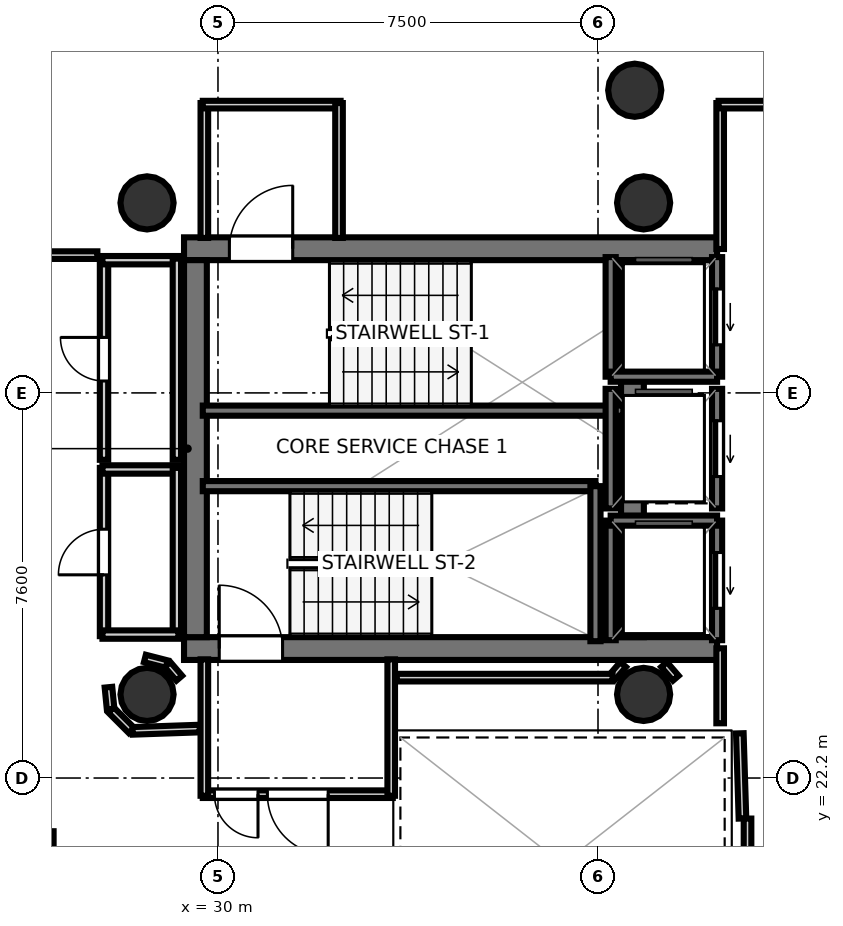
"""IFC4 building model, lengths in metres.
Left out: names, types, materials, properties, quantities, classifications, styles, units other than length and angle.
Written with IfcOpenShell. Run it as: python <this file> out.ifc"""

import sys

from ifc_helpers import new_model, si_unit, direction, frame, frame_2d, origin, origin_2d, place, context, subcontext, project, spatial, rectangle, hollow_circle, extrude, element, fill, save


model = new_model("IFC4")
c1 = context("Model", 3, precision=1e-05, world=origin(), true_north=direction((0.0, 1.0)))
c2 = subcontext(c1, "Body", "Model", "MODEL_VIEW")
j1 = project(units=[si_unit("LENGTHUNIT", "METRE"), si_unit("PLANEANGLEUNIT", "RADIAN")], contexts=[c1])
p1 = place(None, origin())
s1 = spatial("IfcSite", under=j1, at=p1, CompositionType="ELEMENT")
p2 = place(p1, origin())
s2 = spatial("IfcBuilding", under=s1, at=p2, CompositionType="ELEMENT")
p3 = place(p2, frame((0.0, 0.0, 246.4)))
s3 = spatial("IfcBuildingStorey", under=s2, at=p3, CompositionType="ELEMENT", Elevation=246.4)
p4 = place(p3, frame((29.33, 32.645, 0.0), z_axis=(0.0, 0.0, 1.0), x_axis=(1.0, 0.0, 0.0)))
e1 = element("IfcWall", 1, at=p4, inside=s3, PredefinedType="SHEAR", context=c2, shape_type="SweptSolid", body=[
    extrude(rectangle(XDim=10.52, YDim=0.45, at=frame_2d((5.26, 0.0))), origin(), (0.0, 0.0, 1.0), 3.52),
])
p5 = place(p4, frame((0.895, 0.0, 0.0)))
e2 = element("IfcOpeningElement", 2, at=p5, cuts=e1, PredefinedType="OPENING", context=c2, shape_type="SweptSolid", body=[
    extrude(rectangle(XDim=1.25, YDim=2.15, at=frame_2d((0.625, 1.075))), frame((0.0, 0.235, 0.0), z_axis=(0.0, -1.0, 0.0), x_axis=(1.0, 0.0, 0.0)), (0.0, 0.0, 1.0), 0.47),
])
p6 = place(p3, frame((29.33, 24.755, 0.0), z_axis=(0.0, 0.0, 1.0), x_axis=(1.0, 0.0, 0.0)))
e3 = element("IfcWall", 3, at=p6, inside=s3, PredefinedType="SHEAR", context=c2, shape_type="SweptSolid", body=[
    extrude(rectangle(XDim=10.52, YDim=0.45, at=frame_2d((5.26, 0.0))), origin(), (0.0, 0.0, 1.0), 3.52),
])
p7 = place(p6, frame((0.695, 0.0, 0.0)))
e4 = element("IfcOpeningElement", 4, at=p7, cuts=e3, PredefinedType="OPENING", context=c2, shape_type="SweptSolid", body=[
    extrude(rectangle(XDim=1.25, YDim=2.15, at=frame_2d((0.625, 1.075))), frame((0.0, 0.235, 0.0), z_axis=(0.0, -1.0, 0.0), x_axis=(1.0, 0.0, 0.0)), (0.0, 0.0, 1.0), 0.47),
])
for number, where, z_axis, x_axis in (
    (5, (29.555, 24.98, 0.0), (0.0, 0.0, 1.0), (0.0, 1.0, 0.0)),
    (6, (38.18, 24.98, 0.0), (0.0, 0.0, 1.0), (0.0, 1.0, 0.0)),
):
    element("IfcWall", number, at=place(p3, frame(where, z_axis=z_axis, x_axis=x_axis)), inside=s3, PredefinedType="SHEAR", context=c2, shape_type="SweptSolid", body=[
        extrude(rectangle(XDim=7.44, YDim=0.45, at=frame_2d((3.72, 0.0))), origin(), (0.0, 0.0, 1.0), 3.52),
    ])
for number, where, z_axis, x_axis in (
    (7, (28.6, 33.55, 0.0), (0.0, 0.0, 1.0), (1.0, 0.0, 0.0)),
    (8, (28.6, 23.85, 0.0), (0.0, 0.0, 1.0), (1.0, 0.0, 0.0)),
    (9, (38.4, 33.55, 0.0), (0.0, 0.0, 1.0), (1.0, 0.0, 0.0)),
    (10, (38.4, 23.85, 0.0), (0.0, 0.0, 1.0), (1.0, 0.0, 0.0)),
    (11, (38.225, 35.773, 0.0), (0.0, 0.0, 1.0), (1.0, 0.0, 0.0)),
):
    element("IfcColumn", number, at=place(p3, frame(where, z_axis=z_axis, x_axis=x_axis)), inside=s3, PredefinedType="COLUMN", context=c2, shape_type="SweptSolid", body=[
        extrude(hollow_circle(Radius=0.525, WallThickness=0.028, at=origin_2d()), origin(), (0.0, 0.0, 1.0), 3.7),
    ])
p8 = place(p3, frame((29.7, 29.45, 0.0), z_axis=(0.0, 0.0, 1.0), x_axis=(1.0, 0.0, 0.0)))
e12 = element("IfcWall", 12, at=p8, inside=s3, PredefinedType="SOLIDWALL", context=c2, shape_type="SweptSolid", body=[
    extrude(rectangle(XDim=8.3, YDim=0.2, at=frame_2d((4.15, 0.0))), origin(), (0.0, 0.0, 1.0), 3.52),
])
p9 = place(p3, frame((29.7, 27.96, 0.0), z_axis=(0.0, 0.0, 1.0), x_axis=(1.0, 0.0, 0.0)))
e13 = element("IfcWall", 13, at=p9, inside=s3, PredefinedType="SOLIDWALL", context=c2, shape_type="SweptSolid", body=[
    extrude(rectangle(XDim=7.75, YDim=0.2, at=frame_2d((3.875, 0.0))), origin(), (0.0, 0.0, 1.0), 3.52),
])
p10 = place(p3, frame((37.45, 24.9, 0.0), z_axis=(0.0, 0.0, 1.0), x_axis=(0.0, 1.0, 0.0)))
e14 = element("IfcWall", 14, at=p10, inside=s3, PredefinedType="SOLIDWALL", context=c2, shape_type="SweptSolid", body=[
    extrude(rectangle(XDim=3.06, YDim=0.2, at=frame_2d((1.53, 0.0))), origin(), (0.0, 0.0, 1.0), 3.52),
])
p11 = place(p3, frame((39.85, 30.12, 0.0), z_axis=(0.0, 0.0, 1.0), x_axis=(0.0, 1.0, 0.0)))
e15 = element("IfcWall", 15, at=p11, inside=s3, PredefinedType="SOLIDWALL", context=c2, shape_type="SweptSolid", body=[
    extrude(rectangle(XDim=2.36, YDim=0.2, at=frame_2d((1.18, 0.0))), origin(), (0.0, 0.0, 1.0), 3.52),
])
p12 = place(p11, frame((0.63, 0.0, 0.0)))
e16 = element("IfcOpeningElement", 16, at=p12, cuts=e15, PredefinedType="OPENING", context=c2, shape_type="SweptSolid", body=[
    extrude(rectangle(XDim=1.1, YDim=2.15, at=frame_2d((0.55, 1.075))), frame((0.0, 0.11, 0.0), z_axis=(0.0, -1.0, 0.0), x_axis=(1.0, 0.0, 0.0)), (0.0, 0.0, 1.0), 0.22),
])
p13 = place(p3, frame((37.75, 30.12, 0.0), z_axis=(0.0, 0.0, 1.0), x_axis=(0.0, 1.0, 0.0)))
e17 = element("IfcWall", 17, at=p13, inside=s3, PredefinedType="SOLIDWALL", context=c2, shape_type="SweptSolid", body=[
    extrude(rectangle(XDim=2.36, YDim=0.2, at=frame_2d((1.18, 0.0))), origin(), (0.0, 0.0, 1.0), 3.52),
])
p14 = place(p3, frame((37.75, 30.12, 0.0), z_axis=(0.0, 0.0, 1.0), x_axis=(1.0, 0.0, 0.0)))
e18 = element("IfcWall", 18, at=p14, inside=s3, PredefinedType="SOLIDWALL", context=c2, shape_type="SweptSolid", body=[
    extrude(rectangle(XDim=2.1, YDim=0.2, at=frame_2d((1.05, 0.0))), origin(), (0.0, 0.0, 1.0), 3.52),
])
p15 = place(p3, frame((39.85, 24.92, 0.0), z_axis=(0.0, 0.0, 1.0), x_axis=(0.0, 1.0, 0.0)))
e19 = element("IfcWall", 19, at=p15, inside=s3, PredefinedType="SOLIDWALL", context=c2, shape_type="SweptSolid", body=[
    extrude(rectangle(XDim=2.36, YDim=0.2, at=frame_2d((1.18, 0.0))), origin(), (0.0, 0.0, 1.0), 3.52),
])
p16 = place(p15, frame((0.63, 0.0, 0.0)))
e20 = element("IfcOpeningElement", 20, at=p16, cuts=e19, PredefinedType="OPENING", context=c2, shape_type="SweptSolid", body=[
    extrude(rectangle(XDim=1.1, YDim=2.15, at=frame_2d((0.55, 1.075))), frame((0.0, 0.11, 0.0), z_axis=(0.0, -1.0, 0.0), x_axis=(1.0, 0.0, 0.0)), (0.0, 0.0, 1.0), 0.22),
])
p17 = place(p3, frame((37.75, 24.92, 0.0), z_axis=(0.0, 0.0, 1.0), x_axis=(0.0, 1.0, 0.0)))
e21 = element("IfcWall", 21, at=p17, inside=s3, PredefinedType="SOLIDWALL", context=c2, shape_type="SweptSolid", body=[
    extrude(rectangle(XDim=2.36, YDim=0.2, at=frame_2d((1.18, 0.0))), origin(), (0.0, 0.0, 1.0), 3.52),
])
p18 = place(p3, frame((37.75, 27.28, 0.0), z_axis=(0.0, 0.0, 1.0), x_axis=(1.0, 0.0, 0.0)))
e22 = element("IfcWall", 22, at=p18, inside=s3, PredefinedType="SOLIDWALL", context=c2, shape_type="SweptSolid", body=[
    extrude(rectangle(XDim=2.1, YDim=0.2, at=frame_2d((1.05, 0.0))), origin(), (0.0, 0.0, 1.0), 3.52),
])
p19 = place(p3, frame((39.85, 27.52, 0.0), z_axis=(0.0, 0.0, 1.0), x_axis=(0.0, 1.0, 0.0)))
e23 = element("IfcWall", 23, at=p19, inside=s3, PredefinedType="SOLIDWALL", context=c2, shape_type="SweptSolid", body=[
    extrude(rectangle(XDim=2.36, YDim=0.2, at=frame_2d((1.18, 0.0))), origin(), (0.0, 0.0, 1.0), 3.52),
])
p20 = place(p19, frame((0.63, 0.0, 0.0)))
e24 = element("IfcOpeningElement", 24, at=p20, cuts=e23, PredefinedType="OPENING", context=c2, shape_type="SweptSolid", body=[
    extrude(rectangle(XDim=1.1, YDim=2.15, at=frame_2d((0.55, 1.075))), frame((0.0, 0.11, 0.0), z_axis=(0.0, -1.0, 0.0), x_axis=(1.0, 0.0, 0.0)), (0.0, 0.0, 1.0), 0.22),
])
p21 = place(p3, frame((37.75, 27.52, 0.0), z_axis=(0.0, 0.0, 1.0), x_axis=(0.0, 1.0, 0.0)))
e25 = element("IfcWall", 25, at=p21, inside=s3, PredefinedType="SOLIDWALL", context=c2, shape_type="SweptSolid", body=[
    extrude(rectangle(XDim=2.36, YDim=0.2, at=frame_2d((1.18, 0.0))), origin(), (0.0, 0.0, 1.0), 3.52),
])
p22 = place(p3, frame((29.731, 32.858, 0.0), z_axis=(0.0, 0.0, 1.0), x_axis=(0.0, 1.0, 0.0)))
e26 = element("IfcWall", 26, at=p22, inside=s3, PredefinedType="PARTITIONING", context=c2, shape_type="SweptSolid", body=[
    extrude(rectangle(XDim=2.662, YDim=0.15, at=frame_2d((1.331, 0.0))), origin(), (0.0, 0.0, 1.0), 2.84),
])
p23 = place(p3, frame((29.7, 35.489, 0.0), z_axis=(0.0, 0.0, 1.0), x_axis=(1.0, 0.0, 0.0)))
e27 = element("IfcWall", 27, at=p23, inside=s3, PredefinedType="PARTITIONING", context=c2, shape_type="SweptSolid", body=[
    extrude(rectangle(XDim=2.72, YDim=0.15, at=frame_2d((1.36, 0.0))), origin(), (0.0, 0.0, 1.0), 2.84),
])
p24 = place(p3, frame((32.389, 35.52, 0.0), z_axis=(0.0, 0.0, 1.0), x_axis=(0.0, -1.0, 0.0)))
e28 = element("IfcWall", 28, at=p24, inside=s3, PredefinedType="PARTITIONING", context=c2, shape_type="SweptSolid", body=[
    extrude(rectangle(XDim=2.662, YDim=0.15, at=frame_2d((1.331, 0.0))), origin(), (0.0, 0.0, 1.0), 2.84),
])
p25 = place(p3, frame((33.45, 21.881, 0.0), z_axis=(0.0, 0.0, 1.0), x_axis=(-1.0, 0.0, 0.0)))
e29 = element("IfcWall", 29, at=p25, inside=s3, PredefinedType="PARTITIONING", context=c2, shape_type="SweptSolid", body=[
    extrude(rectangle(XDim=3.75, YDim=0.15, at=frame_2d((1.875, 0.0))), origin(), (0.0, 0.0, 1.0), 2.84),
])
p26 = place(p25, frame((1.275, 0.0, 0.0)))
e30 = element("IfcOpeningElement", 30, at=p26, cuts=e29, PredefinedType="OPENING", context=c2, shape_type="SweptSolid", body=[
    extrude(rectangle(XDim=1.2, YDim=2.15, at=frame_2d((0.6, 1.075))), frame((0.0, 0.085, 0.0), z_axis=(0.0, -1.0, 0.0), x_axis=(1.0, 0.0, 0.0)), (0.0, 0.0, 1.0), 0.17),
])
p27 = place(p25, frame((2.66, 0.0, 0.0)))
e31 = element("IfcOpeningElement", 31, at=p27, cuts=e29, PredefinedType="OPENING", context=c2, shape_type="SweptSolid", body=[
    extrude(rectangle(XDim=0.86, YDim=2.05, at=frame_2d((0.43, 1.025))), frame((0.0, 0.085, 0.0), z_axis=(0.0, -1.0, 0.0), x_axis=(1.0, 0.0, 0.0)), (0.0, 0.0, 1.0), 0.17),
])
for number, where, z_axis, x_axis in (
    (32, (29.731, 21.85, 0.0), (0.0, 0.0, 1.0), (0.0, 1.0, 0.0)),
    (33, (33.419, 24.542, 0.0), (0.0, 0.0, 1.0), (0.0, -1.0, 0.0)),
):
    element("IfcWall", number, at=place(p3, frame(where, z_axis=z_axis, x_axis=x_axis)), inside=s3, PredefinedType="PARTITIONING", context=c2, shape_type="SweptSolid", body=[
        extrude(rectangle(XDim=2.692, YDim=0.15, at=frame_2d((1.346, 0.0))), origin(), (0.0, 0.0, 1.0), 2.84),
    ])
p28 = place(p3, frame((40.351, 21.401, 0.0), z_axis=(0.0, 0.0, 1.0), x_axis=(-0.031058045979, 0.999517582527, 0.0)))
e34 = element("IfcWall", 34, at=p28, inside=s3, PredefinedType="PARTITIONING", context=c2, shape_type="SweptSolid", body=[
    extrude(rectangle(XDim=1.682, YDim=0.15, at=frame_2d((0.841, 0.0))), origin(), (0.0, 0.0, 1.0), 2.84),
])
p29 = place(p3, frame((39.911, 23.28, 0.0), z_axis=(0.0, 0.0, 1.0), x_axis=(0.0, 1.0, 0.0)))
e35 = element("IfcWall", 35, at=p29, inside=s3, PredefinedType="PARTITIONING", context=c2, shape_type="SweptSolid", body=[
    extrude(rectangle(XDim=1.48, YDim=0.15, at=frame_2d((0.74, 0.0))), origin(), (0.0, 0.0, 1.0), 2.84),
])
p30 = place(p3, frame((39.911, 32.64, 0.0), z_axis=(0.0, 0.0, 1.0), x_axis=(0.0, 1.0, 0.0)))
e36 = element("IfcWall", 36, at=p30, inside=s3, PredefinedType="PARTITIONING", context=c2, shape_type="SweptSolid", body=[
    extrude(rectangle(XDim=2.88, YDim=0.15, at=frame_2d((1.44, 0.0))), origin(), (0.0, 0.0, 1.0), 2.84),
])
p31 = place(p3, frame((39.88, 35.489, 0.0), z_axis=(0.0, 0.0, 1.0), x_axis=(1.0, 0.0, 0.0)))
e37 = element("IfcWall", 37, at=p31, inside=s3, PredefinedType="PARTITIONING", context=c2, shape_type="SweptSolid", body=[
    extrude(rectangle(XDim=1.48, YDim=0.15, at=frame_2d((0.74, 0.0))), origin(), (0.0, 0.0, 1.0), 2.84),
])
p32 = place(p3, frame((40.451, 18.08, 0.0), z_axis=(0.0, 0.0, 1.0), x_axis=(0.0, 1.0, 0.0)))
e38 = element("IfcWall", 38, at=p32, inside=s3, PredefinedType="PARTITIONING", context=c2, shape_type="SweptSolid", body=[
    extrude(rectangle(XDim=3.32, YDim=0.15, at=frame_2d((1.66, 0.0))), origin(), (0.0, 0.0, 1.0), 2.84),
])
p33 = place(p3, frame((27.751, 25.0, 0.0), z_axis=(0.0, 0.0, 1.0), x_axis=(0.0, 1.0, 0.0)))
e39 = element("IfcWall", 39, at=p33, inside=s3, PredefinedType="PLUMBINGWALL", context=c2, shape_type="SweptSolid", body=[
    extrude(rectangle(XDim=3.32, YDim=0.165, at=frame_2d((1.66, 0.0))), origin(), (0.0, 0.0, 1.0), 2.84),
])
p34 = place(p33, frame((1.21, 0.0, 0.0)))
e40 = element("IfcOpeningElement", 40, at=p34, cuts=e39, PredefinedType="OPENING", context=c2, shape_type="SweptSolid", body=[
    extrude(rectangle(XDim=0.9, YDim=2.1, at=frame_2d((0.45, 1.05))), frame((0.0, 0.093, 0.0), z_axis=(0.0, -1.0, 0.0), x_axis=(1.0, 0.0, 0.0)), (0.0, 0.0, 1.0), 0.185),
])
p35 = place(p3, frame((27.72, 28.289, 0.0), z_axis=(0.0, 0.0, 1.0), x_axis=(1.0, 0.0, 0.0)))
e41 = element("IfcWall", 41, at=p35, inside=s3, PredefinedType="PLUMBINGWALL", context=c2, shape_type="SweptSolid", body=[
    extrude(rectangle(XDim=1.5, YDim=0.165, at=frame_2d((0.75, 0.0))), origin(), (0.0, 0.0, 1.0), 2.84),
])
p36 = place(p3, frame((29.189, 28.32, 0.0), z_axis=(0.0, 0.0, 1.0), x_axis=(0.0, -1.0, 0.0)))
e42 = element("IfcWall", 42, at=p36, inside=s3, PredefinedType="PLUMBINGWALL", context=c2, shape_type="SweptSolid", body=[
    extrude(rectangle(XDim=3.32, YDim=0.165, at=frame_2d((1.66, 0.0))), origin(), (0.0, 0.0, 1.0), 2.84),
])
p37 = place(p3, frame((29.22, 25.031, 0.0), z_axis=(0.0, 0.0, 1.0), x_axis=(-1.0, 0.0, 0.0)))
e43 = element("IfcWall", 43, at=p37, inside=s3, PredefinedType="PLUMBINGWALL", context=c2, shape_type="SweptSolid", body=[
    extrude(rectangle(XDim=1.5, YDim=0.165, at=frame_2d((0.75, 0.0))), origin(), (0.0, 0.0, 1.0), 2.84),
])
p38 = place(p3, frame((27.751, 28.48, 0.0), z_axis=(0.0, 0.0, 1.0), x_axis=(0.0, 1.0, 0.0)))
e44 = element("IfcWall", 44, at=p38, inside=s3, PredefinedType="PLUMBINGWALL", context=c2, shape_type="SweptSolid", body=[
    extrude(rectangle(XDim=3.97, YDim=0.165, at=frame_2d((1.985, 0.0))), origin(), (0.0, 0.0, 1.0), 2.84),
])
p39 = place(p38, frame((1.555, 0.0, 0.0)))
e45 = element("IfcOpeningElement", 45, at=p39, cuts=e44, PredefinedType="OPENING", context=c2, shape_type="SweptSolid", body=[
    extrude(rectangle(XDim=0.86, YDim=2.05, at=frame_2d((0.43, 1.025))), frame((0.0, 0.093, 0.0), z_axis=(0.0, -1.0, 0.0), x_axis=(1.0, 0.0, 0.0)), (0.0, 0.0, 1.0), 0.185),
])
p40 = place(p3, frame((27.72, 32.419, 0.0), z_axis=(0.0, 0.0, 1.0), x_axis=(1.0, 0.0, 0.0)))
e46 = element("IfcWall", 46, at=p40, inside=s3, PredefinedType="PLUMBINGWALL", context=c2, shape_type="SweptSolid", body=[
    extrude(rectangle(XDim=1.5, YDim=0.165, at=frame_2d((0.75, 0.0))), origin(), (0.0, 0.0, 1.0), 2.84),
])
p41 = place(p3, frame((29.189, 32.45, 0.0), z_axis=(0.0, 0.0, 1.0), x_axis=(0.0, -1.0, 0.0)))
e47 = element("IfcWall", 47, at=p41, inside=s3, PredefinedType="PLUMBINGWALL", context=c2, shape_type="SweptSolid", body=[
    extrude(rectangle(XDim=3.97, YDim=0.165, at=frame_2d((1.985, 0.0))), origin(), (0.0, 0.0, 1.0), 2.84),
])
p42 = place(p3, frame((29.236, 24.17, 0.0), z_axis=(0.0, 0.0, 1.0), x_axis=(-0.652260263346, 0.757995084984, 0.0)))
e48 = element("IfcWall", 48, at=p42, inside=s3, PredefinedType="PARTITIONING", context=c2, shape_type="SweptSolid", body=[
    extrude(rectangle(XDim=0.355, YDim=0.15, at=frame_2d((0.178, 0.0))), origin(), (0.0, 0.0, 1.0), 2.84),
])
p43 = place(p3, frame((28.988, 24.45, 0.0), z_axis=(0.0, 0.0, 1.0), x_axis=(-0.968704505916, 0.248216800836, 0.0)))
e49 = element("IfcWall", 49, at=p43, inside=s3, PredefinedType="PARTITIONING", context=c2, shape_type="SweptSolid", body=[
    extrude(rectangle(XDim=0.445, YDim=0.15, at=frame_2d((0.222, 0.0))), origin(), (0.0, 0.0, 1.0), 2.84),
])
p44 = place(p3, frame((39.036, 24.17, 0.0), z_axis=(0.0, 0.0, 1.0), x_axis=(-0.652260263346, 0.757995084984, 0.0)))
e50 = element("IfcWall", 50, at=p44, inside=s3, PredefinedType="PARTITIONING", context=c2, shape_type="SweptSolid", body=[
    extrude(rectangle(XDim=0.355, YDim=0.15, at=frame_2d((0.178, 0.0))), origin(), (0.0, 0.0, 1.0), 2.84),
])
p45 = place(p3, frame((37.996, 24.44, 0.0), z_axis=(0.0, 0.0, 1.0), x_axis=(-0.652425645794, -0.757852740782, 0.0)))
e51 = element("IfcWall", 51, at=p45, inside=s3, PredefinedType="PARTITIONING", context=c2, shape_type="SweptSolid", body=[
    extrude(rectangle(XDim=0.32, YDim=0.15, at=frame_2d((0.16, 0.0))), origin(), (0.0, 0.0, 1.0), 2.84),
])
p46 = place(p3, frame((37.787, 24.181, 0.0), z_axis=(0.0, 0.0, 1.0), x_axis=(-1.0, 0.0, 0.0)))
e52 = element("IfcWall", 52, at=p46, inside=s3, PredefinedType="PARTITIONING", context=c2, shape_type="SweptSolid", body=[
    extrude(rectangle(XDim=4.257, YDim=0.15, at=frame_2d((2.129, 0.0))), origin(), (0.0, 0.0, 1.0), 2.84),
])
p47 = place(p3, frame((27.838, 23.992, 0.0), z_axis=(0.0, 0.0, 1.0), x_axis=(0.098273407977, -0.995159453196, 0.0)))
e53 = element("IfcWall", 53, at=p47, inside=s3, PredefinedType="PARTITIONING", context=c2, shape_type="SweptSolid", body=[
    extrude(rectangle(XDim=0.432, YDim=0.15, at=frame_2d((0.216, 0.0))), origin(), (0.0, 0.0, 1.0), 2.84),
])
p48 = place(p3, frame((27.89, 23.543, 0.0), z_axis=(0.0, 0.0, 1.0), x_axis=(0.707106781187, -0.707106781187, 0.0)))
e54 = element("IfcWall", 54, at=p48, inside=s3, PredefinedType="PARTITIONING", context=c2, shape_type="SweptSolid", body=[
    extrude(rectangle(XDim=0.57, YDim=0.15, at=frame_2d((0.285, 0.0))), origin(), (0.0, 0.0, 1.0), 2.84),
])
p49 = place(p3, frame((28.316, 23.131, 0.0), z_axis=(0.0, 0.0, 1.0), x_axis=(0.999405342193, 0.034481328227, 0.0)))
e55 = element("IfcWall", 55, at=p49, inside=s3, PredefinedType="PARTITIONING", context=c2, shape_type="SweptSolid", body=[
    extrude(rectangle(XDim=1.324, YDim=0.15, at=frame_2d((0.662, 0.0))), origin(), (0.0, 0.0, 1.0), 2.84),
])
p50 = place(p3, frame((26.681, 17.95, 0.0), z_axis=(0.0, 0.0, 1.0), x_axis=(0.0, 1.0, 0.0)))
e56 = element("IfcWall", 56, at=p50, inside=s3, PredefinedType="PARTITIONING", context=c2, shape_type="SweptSolid", body=[
    extrude(rectangle(XDim=3.2, YDim=0.15, at=frame_2d((1.6, 0.0))), origin(), (0.0, 0.0, 1.0), 2.84),
])
p51 = place(p3, frame((25.25, 32.519, 0.0), z_axis=(0.0, 0.0, 1.0), x_axis=(1.0, 0.0, 0.0)))
e57 = element("IfcWall", 57, at=p51, inside=s3, PredefinedType="PARTITIONING", context=c2, shape_type="SweptSolid", body=[
    extrude(rectangle(XDim=2.37, YDim=0.15, at=frame_2d((1.185, 0.0))), origin(), (0.0, 0.0, 1.0), 2.84),
])
p52 = place(p3, frame((27.214, 14.211, 0.0), z_axis=(0.0, 0.0, 1.0), x_axis=(-0.388823456639, 0.921312281242, 0.0)))
e58 = element("IfcWall", 58, at=p52, inside=s3, PredefinedType="PARTITIONING", context=c2, shape_type="SweptSolid", body=[
    extrude(rectangle(XDim=8.771, YDim=0.105, at=frame_2d((4.385, 0.0))), origin(), (0.0, 0.0, 1.0), 2.84),
])
p53 = place(p3, frame((22.282, 37.164, 0.0), z_axis=(0.0, 0.0, 1.0), x_axis=(0.99966963281, -0.025702630935, 0.0)))
e59 = element("IfcWall", 59, at=p53, inside=s3, PredefinedType="PARTITIONING", context=c2, shape_type="SweptSolid", body=[
    extrude(rectangle(XDim=34.661, YDim=0.12, at=frame_2d((17.33, 0.0))), origin(), (0.0, 0.0, 1.0), 2.84),
])
p54 = place(p5, origin())
e60 = element("IfcDoor", 60, at=p54, inside=s3, OperationType="SINGLE_SWING_RIGHT", PredefinedType="DOOR", context=c2, shape_type="SweptSolid", body=[
    extrude(rectangle(XDim=1.25, YDim=2.15, at=frame_2d((0.625, 1.075))), frame((0.0, 0.025, 0.0), z_axis=(0.0, -1.0, 0.0), x_axis=(1.0, 0.0, 0.0)), (0.0, 0.0, 1.0), 0.05),
])
fill(e2, e60)
p55 = place(p7, origin())
e61 = element("IfcDoor", 61, at=p55, inside=s3, OperationType="SINGLE_SWING_LEFT", PredefinedType="DOOR", context=c2, shape_type="SweptSolid", body=[
    extrude(rectangle(XDim=1.25, YDim=2.15, at=frame_2d((0.625, 1.075))), frame((0.0, 0.025, 0.0), z_axis=(0.0, -1.0, 0.0), x_axis=(1.0, 0.0, 0.0)), (0.0, 0.0, 1.0), 0.05),
])
fill(e4, e61)
p56 = place(p12, origin())
e62 = element("IfcDoor", 62, at=p56, inside=s3, OperationType="SLIDING_TO_LEFT", PredefinedType="DOOR", context=c2, shape_type="SweptSolid", body=[
    extrude(rectangle(XDim=1.1, YDim=2.15, at=frame_2d((0.55, 1.075))), frame((0.0, 0.025, 0.0), z_axis=(0.0, -1.0, 0.0), x_axis=(1.0, 0.0, 0.0)), (0.0, 0.0, 1.0), 0.05),
])
fill(e16, e62)
p57 = place(p16, origin())
e63 = element("IfcDoor", 63, at=p57, inside=s3, OperationType="SLIDING_TO_LEFT", PredefinedType="DOOR", context=c2, shape_type="SweptSolid", body=[
    extrude(rectangle(XDim=1.1, YDim=2.15, at=frame_2d((0.55, 1.075))), frame((0.0, 0.025, 0.0), z_axis=(0.0, -1.0, 0.0), x_axis=(1.0, 0.0, 0.0)), (0.0, 0.0, 1.0), 0.05),
])
fill(e20, e63)
p58 = place(p20, origin())
e64 = element("IfcDoor", 64, at=p58, inside=s3, OperationType="SLIDING_TO_LEFT", PredefinedType="DOOR", context=c2, shape_type="SweptSolid", body=[
    extrude(rectangle(XDim=1.1, YDim=2.15, at=frame_2d((0.55, 1.075))), frame((0.0, 0.025, 0.0), z_axis=(0.0, -1.0, 0.0), x_axis=(1.0, 0.0, 0.0)), (0.0, 0.0, 1.0), 0.05),
])
fill(e24, e64)
p59 = place(p26, origin())
e65 = element("IfcDoor", 65, at=p59, inside=s3, OperationType="SINGLE_SWING_LEFT", PredefinedType="DOOR", context=c2, shape_type="SweptSolid", body=[
    extrude(rectangle(XDim=1.2, YDim=2.15, at=frame_2d((0.6, 1.075))), frame((0.0, 0.025, 0.0), z_axis=(0.0, -1.0, 0.0), x_axis=(1.0, 0.0, 0.0)), (0.0, 0.0, 1.0), 0.05),
])
fill(e30, e65)
p60 = place(p34, origin())
e66 = element("IfcDoor", 66, at=p60, inside=s3, OperationType="SINGLE_SWING_LEFT", PredefinedType="DOOR", context=c2, shape_type="SweptSolid", body=[
    extrude(rectangle(XDim=0.9, YDim=2.1, at=frame_2d((0.45, 1.05))), frame((0.0, 0.025, 0.0), z_axis=(0.0, -1.0, 0.0), x_axis=(1.0, 0.0, 0.0)), (0.0, 0.0, 1.0), 0.05),
])
fill(e40, e66)
p61 = place(p39, origin())
e67 = element("IfcDoor", 67, at=p61, inside=s3, OperationType="SINGLE_SWING_RIGHT", PredefinedType="DOOR", context=c2, shape_type="SweptSolid", body=[
    extrude(rectangle(XDim=0.86, YDim=2.05, at=frame_2d((0.43, 1.025))), frame((0.0, 0.025, 0.0), z_axis=(0.0, -1.0, 0.0), x_axis=(1.0, 0.0, 0.0)), (0.0, 0.0, 1.0), 0.05),
])
fill(e45, e67)
p62 = place(p27, origin())
e68 = element("IfcDoor", 68, at=p62, inside=s3, OperationType="SINGLE_SWING_LEFT", PredefinedType="DOOR", context=c2, shape_type="SweptSolid", body=[
    extrude(rectangle(XDim=0.86, YDim=2.05, at=frame_2d((0.43, 1.025))), frame((0.0, 0.025, 0.0), z_axis=(0.0, -1.0, 0.0), x_axis=(1.0, 0.0, 0.0)), (0.0, 0.0, 1.0), 0.05),
])
fill(e31, e68)
save(model, sys.argv[1])
